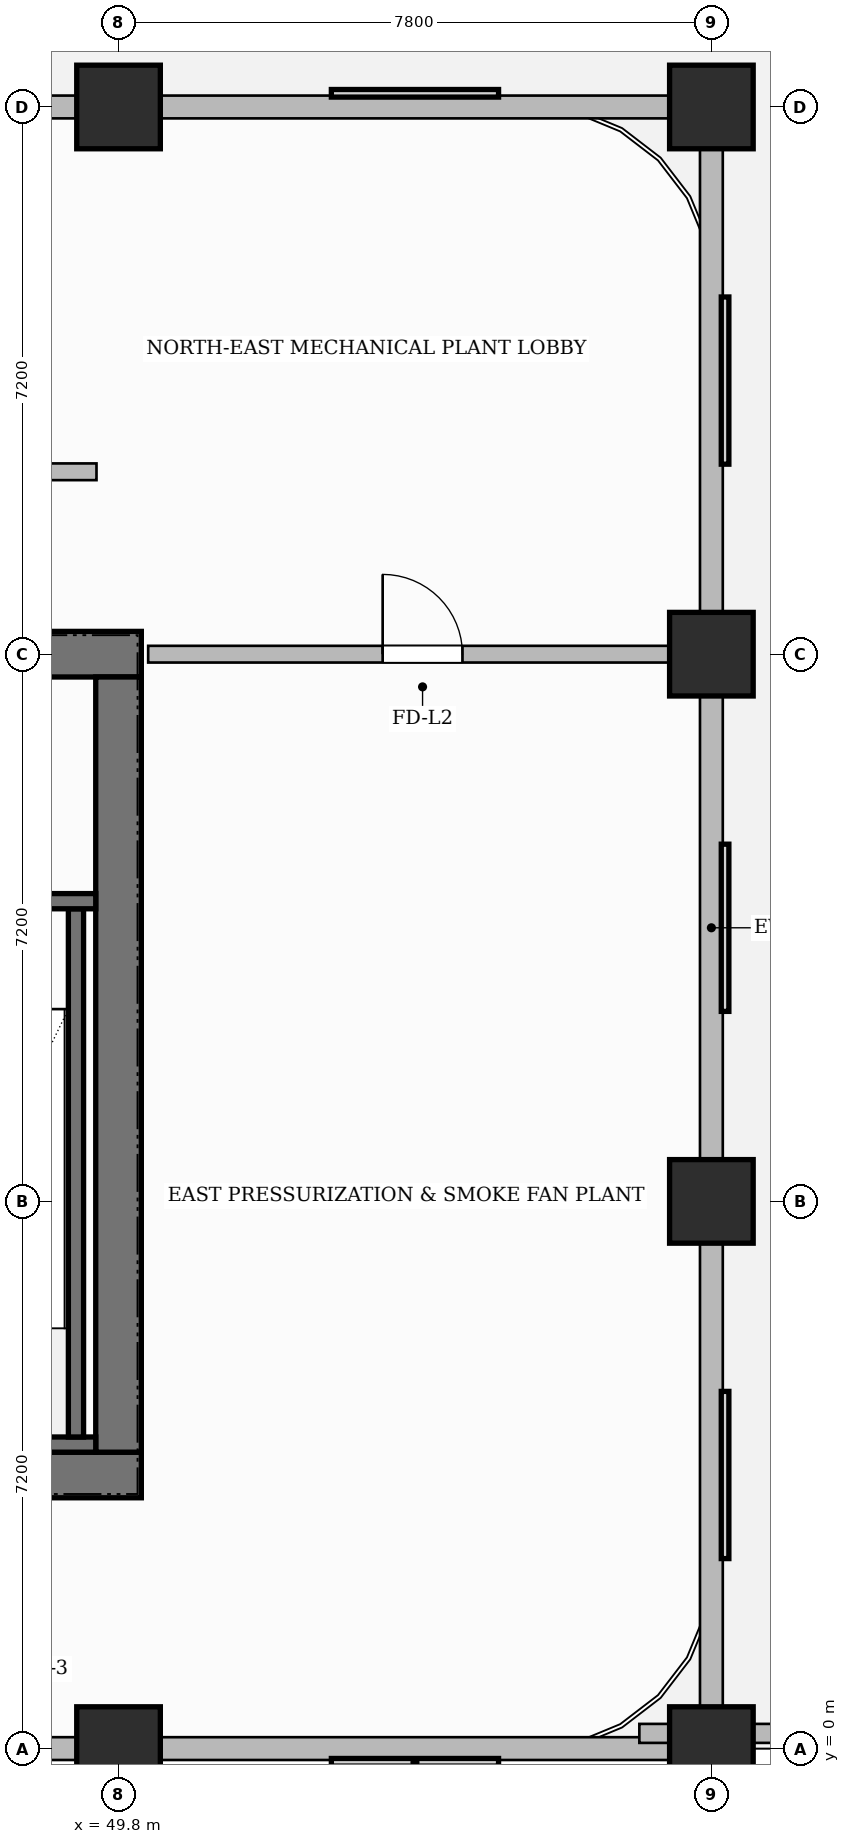
"""IFC4 building model, lengths in metres.
Left out: names, types, materials, properties, quantities, classifications, styles, units other than length and angle.
Written with IfcOpenShell. Run it as: python <this file> out.ifc"""

import sys

from ifc_helpers import new_model, si_unit, direction, frame, frame_2d, origin, origin_2d, place, context, subcontext, project, spatial, rectangle, extrude, source, transform, mapped, element, fill, save


model = new_model("IFC4")
c1 = context("Model", 3, precision=1e-05, world=origin(), true_north=direction((0.0, 1.0)))
c2 = subcontext(c1, "Body", "Model", "MODEL_VIEW")
j1 = project(units=[si_unit("LENGTHUNIT", "METRE"), si_unit("PLANEANGLEUNIT", "RADIAN")], contexts=[c1])
p1 = place(None, origin())
s1 = spatial("IfcSite", under=j1, at=p1, CompositionType="ELEMENT")
p2 = place(p1, origin())
s2 = spatial("IfcBuilding", under=s1, at=p2, CompositionType="ELEMENT")
p3 = place(p2, frame((0.0, 0.0, 27.0)))
s3 = spatial("IfcBuildingStorey", under=s2, at=p3, CompositionType="ELEMENT", Elevation=27.0)
p4 = place(p3, frame((34.5, 3.6, 0.0), z_axis=(0.0, 0.0, 1.0), x_axis=(1.0, 0.0, 0.0)))
e1 = element("IfcWall", 1, at=p4, inside=s3, PredefinedType="SHEAR", context=c2, shape_type="SweptSolid", body=[
    extrude(rectangle(XDim=15.6, YDim=0.6, at=frame_2d((7.8, 0.0))), origin(), (0.0, 0.0, 1.0), 5.4),
])
p5 = place(p4, frame((4.85, 0.0, 0.0)))
e2 = element("IfcOpeningElement", 2, at=p5, cuts=e1, PredefinedType="OPENING", context=c2, shape_type="SweptSolid", body=[
    extrude(rectangle(XDim=0.9, YDim=2.1, at=frame_2d((0.45, 1.05))), frame((0.0, 0.31, 0.0), z_axis=(0.0, -1.0, 0.0), x_axis=(1.0, 0.0, 0.0)), (0.0, 0.0, 1.0), 0.62),
])
p6 = place(p4, frame((7.27, 0.0, 0.0)))
e3 = element("IfcOpeningElement", 3, at=p6, cuts=e1, PredefinedType="OPENING", context=c2, shape_type="SweptSolid", body=[
    extrude(rectangle(XDim=0.9, YDim=2.1, at=frame_2d((0.45, 1.05))), frame((0.0, 0.31, 0.0), z_axis=(0.0, -1.0, 0.0), x_axis=(1.0, 0.0, 0.0)), (0.0, 0.0, 1.0), 0.62),
])
p7 = place(p3, frame((34.5, 14.4, 0.0), z_axis=(0.0, 0.0, 1.0), x_axis=(1.0, 0.0, 0.0)))
e4 = element("IfcWall", 4, at=p7, inside=s3, PredefinedType="SHEAR", context=c2, shape_type="SweptSolid", body=[
    extrude(rectangle(XDim=15.6, YDim=0.6, at=frame_2d((7.8, 0.0))), origin(), (0.0, 0.0, 1.0), 5.4),
])
p8 = place(p7, frame((5.43, 0.0, 0.0)))
e5 = element("IfcOpeningElement", 5, at=p8, cuts=e4, PredefinedType="OPENING", context=c2, shape_type="SweptSolid", body=[
    extrude(rectangle(XDim=1.5, YDim=2.2, at=frame_2d((0.75, 1.1))), frame((0.0, 0.31, 0.0), z_axis=(0.0, -1.0, 0.0), x_axis=(1.0, 0.0, 0.0)), (0.0, 0.0, 1.0), 0.62),
])
p9 = place(p7, frame((1.645, 0.0, 0.0)))
e6 = element("IfcOpeningElement", 6, at=p9, cuts=e4, PredefinedType="OPENING", context=c2, shape_type="SweptSolid", body=[
    extrude(rectangle(XDim=1.05, YDim=2.15, at=frame_2d((0.525, 1.075))), frame((0.0, 0.31, 0.0), z_axis=(0.0, -1.0, 0.0), x_axis=(1.0, 0.0, 0.0)), (0.0, 0.0, 1.0), 0.62),
])
p10 = place(p7, frame((11.275, 0.0, 0.0)))
e7 = element("IfcOpeningElement", 7, at=p10, cuts=e4, PredefinedType="OPENING", context=c2, shape_type="SweptSolid", body=[
    extrude(rectangle(XDim=1.05, YDim=2.15, at=frame_2d((0.525, 1.075))), frame((0.0, 0.31, 0.0), z_axis=(0.0, -1.0, 0.0), x_axis=(1.0, 0.0, 0.0)), (0.0, 0.0, 1.0), 0.62),
])
p11 = place(p3, frame((49.8, 3.9, 0.0), z_axis=(0.0, 0.0, 1.0), x_axis=(0.0, 1.0, 0.0)))
e8 = element("IfcWall", 8, at=p11, inside=s3, PredefinedType="SHEAR", context=c2, shape_type="SweptSolid", body=[
    extrude(rectangle(XDim=10.2, YDim=0.6, at=frame_2d((5.1, 0.0))), origin(), (0.0, 0.0, 1.0), 5.4),
])
m1 = source(origin(), c2, "Body", "SweptSolid", [
    extrude(rectangle(XDim=1.1, YDim=1.1, at=origin_2d()), origin(), (0.0, 0.0, 1.0), 5.4),
])
for number, where, z_axis, x_axis in (
    (9, (49.8, 0.0, 0.0), (0.0, 0.0, 1.0), (1.0, 0.0, 0.0)),
    (10, (49.8, 21.6, 0.0), (0.0, 0.0, 1.0), (1.0, 0.0, 0.0)),
    (11, (57.6, 0.0, 0.0), (0.0, 0.0, 1.0), (1.0, 0.0, 0.0)),
    (12, (57.6, 7.2, 0.0), (0.0, 0.0, 1.0), (1.0, 0.0, 0.0)),
    (13, (57.6, 14.4, 0.0), (0.0, 0.0, 1.0), (1.0, 0.0, 0.0)),
    (14, (57.6, 21.6, 0.0), (0.0, 0.0, 1.0), (1.0, 0.0, 0.0)),
):
    element("IfcColumn", number, at=place(p3, frame(where, z_axis=z_axis, x_axis=x_axis)), inside=s3, PredefinedType="COLUMN", context=c2, shape_type="MappedRepresentation", body=[
        mapped(m1, transform((0.0, 0.0, 0.0), scale=1.0)),
    ])
p12 = place(p3, frame((43.12, 4.0, 0.0), z_axis=(0.0, 0.0, 1.0), x_axis=(1.0, 0.0, 0.0)))
e15 = element("IfcWall", 15, at=p12, inside=s3, PredefinedType="SHEAR", context=c2, shape_type="SweptSolid", body=[
    extrude(rectangle(XDim=6.38, YDim=0.2, at=frame_2d((3.19, 0.0))), origin(), (0.0, 0.0, 1.0), 5.4),
])
p13 = place(p3, frame((49.24, 4.1, 0.0), z_axis=(0.0, 0.0, 1.0), x_axis=(0.0, 1.0, 0.0)))
e16 = element("IfcWall", 16, at=p13, inside=s3, PredefinedType="SHEAR", context=c2, shape_type="SweptSolid", body=[
    extrude(rectangle(XDim=6.95, YDim=0.2, at=frame_2d((3.475, 0.0))), origin(), (0.0, 0.0, 1.0), 5.4),
])
p14 = place(p3, frame((43.12, 11.15, 0.0), z_axis=(0.0, 0.0, 1.0), x_axis=(1.0, 0.0, 0.0)))
e17 = element("IfcWall", 17, at=p14, inside=s3, PredefinedType="SHEAR", context=c2, shape_type="SweptSolid", body=[
    extrude(rectangle(XDim=6.38, YDim=0.2, at=frame_2d((3.19, 0.0))), origin(), (0.0, 0.0, 1.0), 5.4),
])
p15 = place(p14, frame((1.045, 0.0, 0.0)))
e18 = element("IfcOpeningElement", 18, at=p15, cuts=e17, PredefinedType="OPENING", context=c2, shape_type="SweptSolid", body=[
    extrude(rectangle(XDim=1.05, YDim=2.2, at=frame_2d((0.525, 1.1))), frame((0.0, 0.11, 0.0), z_axis=(0.0, -1.0, 0.0), x_axis=(1.0, 0.0, 0.0)), (0.0, 0.0, 1.0), 0.22),
])
p16 = place(p14, frame((4.125, 0.0, 0.0)))
e19 = element("IfcOpeningElement", 19, at=p16, cuts=e17, PredefinedType="OPENING", context=c2, shape_type="SweptSolid", body=[
    extrude(rectangle(XDim=1.05, YDim=2.2, at=frame_2d((0.525, 1.1))), frame((0.0, 0.11, 0.0), z_axis=(0.0, -1.0, 0.0), x_axis=(1.0, 0.0, 0.0)), (0.0, 0.0, 1.0), 0.22),
])
p17 = place(p3, frame((50.19, 14.4, 0.0), z_axis=(0.0, 0.0, 1.0), x_axis=(1.0, 0.0, 0.0)))
e20 = element("IfcWall", 20, at=p17, inside=s3, PredefinedType="PARTITIONING", context=c2, shape_type="SweptSolid", body=[
    extrude(rectangle(XDim=7.22, YDim=0.22, at=frame_2d((3.61, 0.0))), origin(), (0.0, 0.0, 1.0), 4.485),
])
p18 = place(p17, frame((3.085, 0.0, 0.0)))
e21 = element("IfcOpeningElement", 21, at=p18, cuts=e20, PredefinedType="OPENING", context=c2, shape_type="SweptSolid", body=[
    extrude(rectangle(XDim=1.05, YDim=2.15, at=frame_2d((0.525, 1.075))), frame((0.0, 0.12, 0.0), z_axis=(0.0, -1.0, 0.0), x_axis=(1.0, 0.0, 0.0)), (0.0, 0.0, 1.0), 0.24),
])
p19 = place(p3, frame((35.29, 16.8, 0.0), z_axis=(0.0, 0.0, 1.0), x_axis=(1.0, 0.0, 0.0)))
e22 = element("IfcWall", 22, at=p19, inside=s3, PredefinedType="PARTITIONING", context=c2, shape_type="SweptSolid", body=[
    extrude(rectangle(XDim=14.22, YDim=0.22, at=frame_2d((7.11, 0.0))), origin(), (0.0, 0.0, 1.0), 5.15),
])
p20 = place(p19, frame((4.76, 0.0, 0.0)))
e23 = element("IfcOpeningElement", 23, at=p20, cuts=e22, PredefinedType="OPENING", context=c2, shape_type="SweptSolid", body=[
    extrude(rectangle(XDim=1.5, YDim=2.2, at=frame_2d((0.75, 1.1))), frame((0.0, 0.12, 0.0), z_axis=(0.0, -1.0, 0.0), x_axis=(1.0, 0.0, 0.0)), (0.0, 0.0, 1.0), 0.24),
])
p21 = place(p3, frame((14.4, 0.0, 0.0), z_axis=(0.0, 0.0, 1.0), x_axis=(1.0, 0.0, 0.0)))
e24 = element("IfcWall", 24, at=p21, inside=s3, PredefinedType="SOLIDWALL", context=c2, shape_type="SweptSolid", body=[
    extrude(rectangle(XDim=43.2, YDim=0.3, at=frame_2d((21.6, 0.0))), origin(), (0.0, 0.0, 1.0), 4.485),
])
p22 = place(p3, frame((57.6, 0.05, 0.0), z_axis=(0.0, 0.0, 1.0), x_axis=(0.0, 1.0, 0.0)))
e25 = element("IfcWall", 25, at=p22, inside=s3, PredefinedType="SOLIDWALL", context=c2, shape_type="SweptSolid", body=[
    extrude(rectangle(XDim=21.5, YDim=0.3, at=frame_2d((10.75, 0.0))), origin(), (0.0, 0.0, 1.0), 4.485),
])
p23 = place(p3, frame((34.8, 21.6, 0.0), z_axis=(0.0, 0.0, 1.0), x_axis=(1.0, 0.0, 0.0)))
e26 = element("IfcWall", 26, at=p23, inside=s3, PredefinedType="SOLIDWALL", context=c2, shape_type="SweptSolid", body=[
    extrude(rectangle(XDim=22.8, YDim=0.3, at=frame_2d((11.4, 0.0))), origin(), (0.0, 0.0, 1.0), 4.485),
])
p24 = place(p3, frame((77.987, 0.2, 0.0), z_axis=(0.0, 0.0, 1.0), x_axis=(-1.0, 0.0, 0.0)))
e27 = element("IfcWall", 27, at=p24, inside=s3, PredefinedType="PARAPET", context=c2, shape_type="SweptSolid", body=[
    extrude(rectangle(XDim=21.334, YDim=0.25, at=frame_2d((10.667, 0.0))), origin(), (0.0, 0.0, 1.0), 0.95),
])
m2 = source(origin(), c2, "Body", "SweptSolid", [
    extrude(rectangle(XDim=1.05, YDim=2.15, at=frame_2d((0.525, 1.075))), frame((0.0, 0.025, 0.0), z_axis=(0.0, -1.0, 0.0), x_axis=(1.0, 0.0, 0.0)), (0.0, 0.0, 1.0), 0.05),
])
p25 = place(p18, origin())
e28 = element("IfcDoor", 28, at=p25, inside=s3, OperationType="SINGLE_SWING_LEFT", PredefinedType="DOOR", context=c2, shape_type="MappedRepresentation", body=[
    mapped(m2, transform((0.0, 0.0, 0.0), scale=1.0)),
])
fill(e21, e28)
save(model, sys.argv[1])
